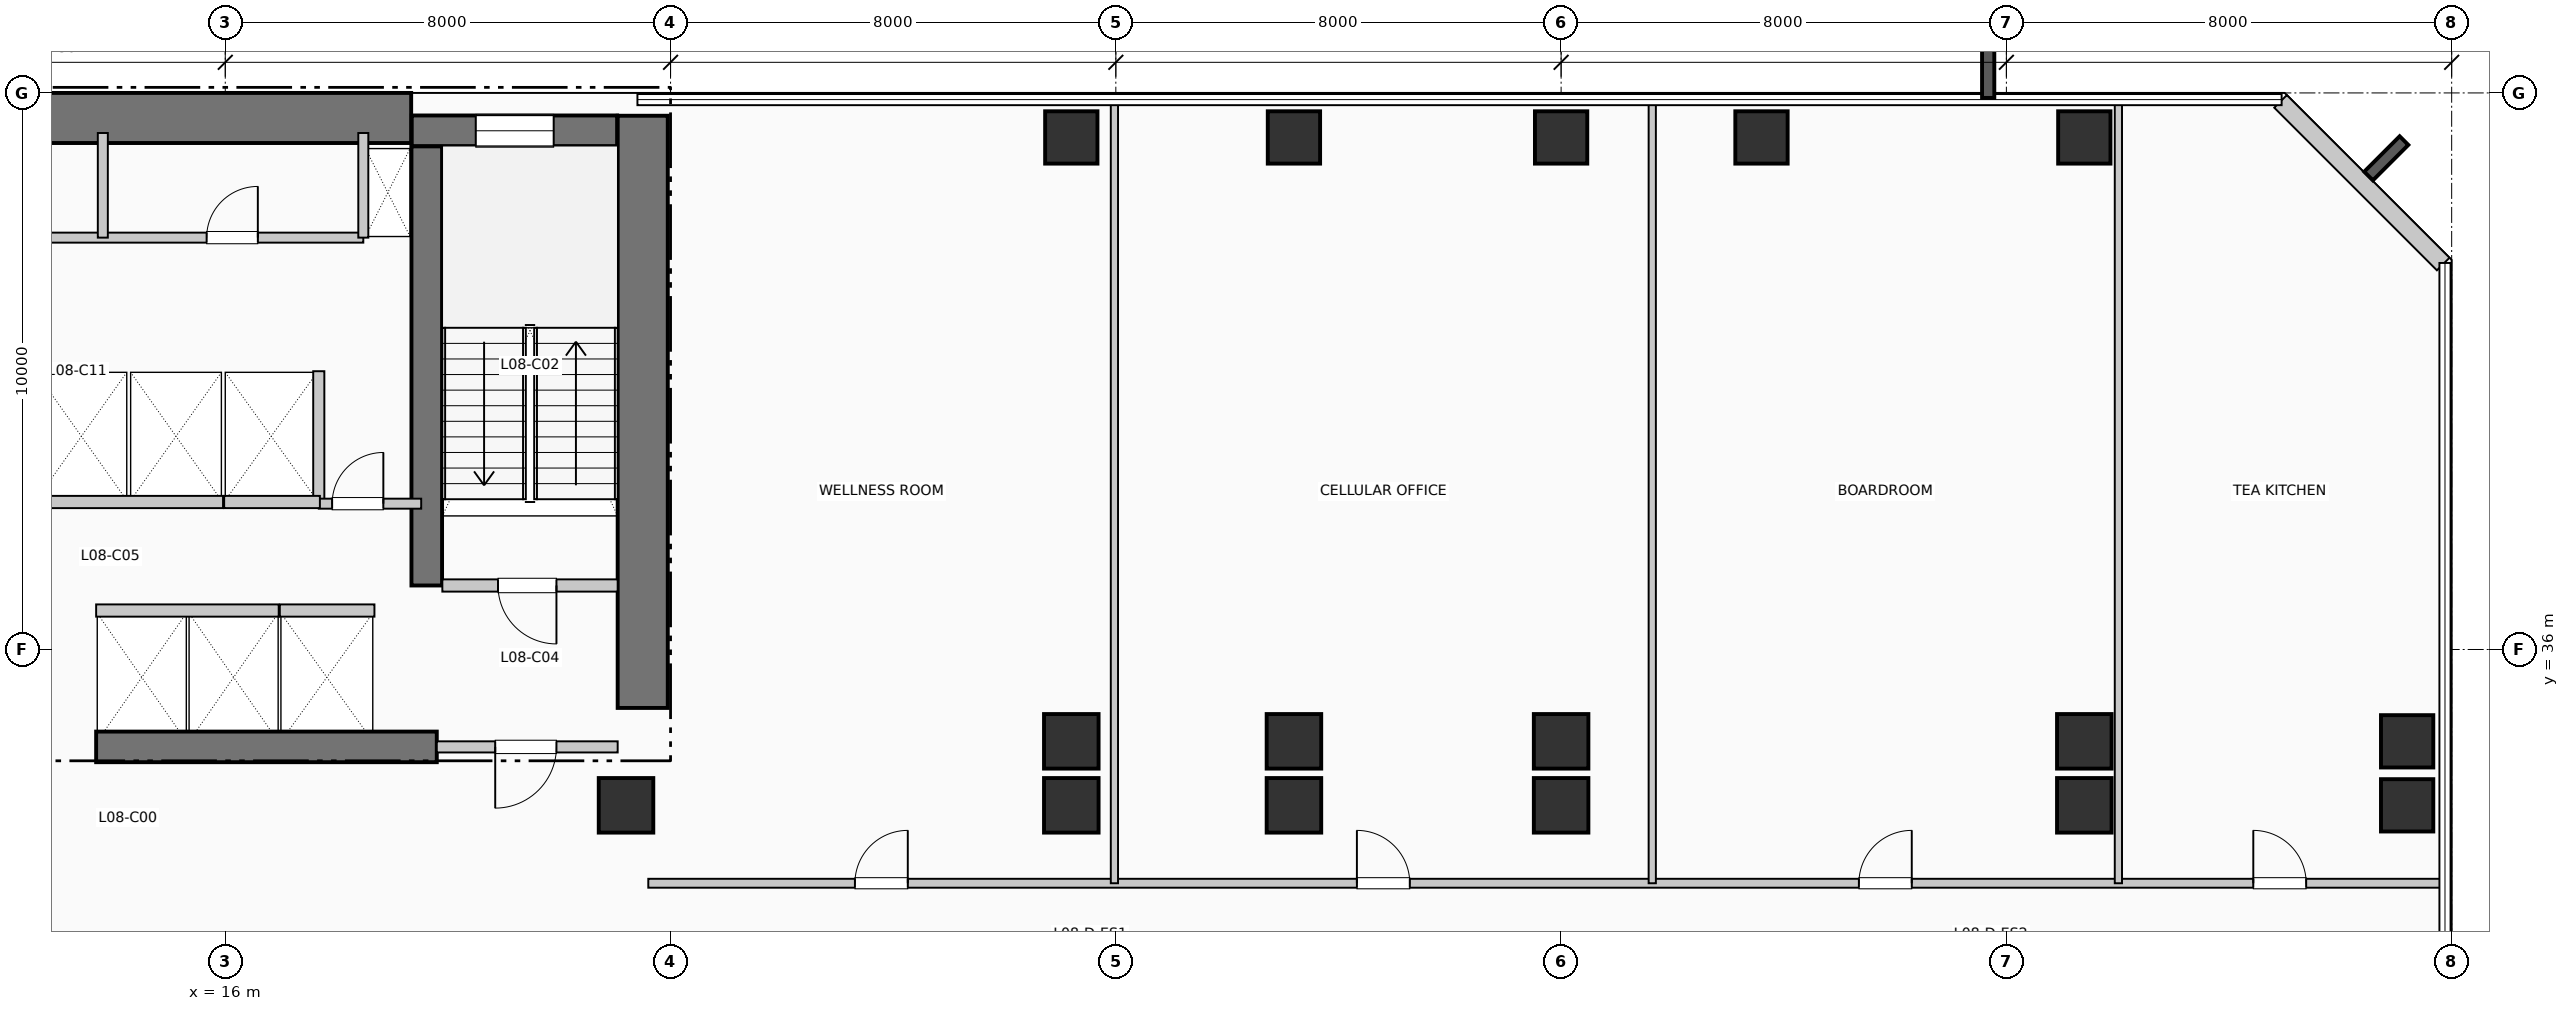
"""IFC4 building model, lengths in metres.
Left out: names, types, materials, properties, quantities, classifications, styles, units other than length and angle.
Written with IfcOpenShell. Run it as: python <this file> out.ifc"""

import sys

from ifc_helpers import new_model, si_unit, direction, frame, frame_2d, origin, origin_2d, place, context, subcontext, project, spatial, rectangle, extrude, element, fill, save


model = new_model("IFC4")
c1 = context("Model", 3, precision=1e-05, world=origin(), true_north=direction((0.0, 1.0)))
c2 = subcontext(c1, "Body", "Model", "MODEL_VIEW")
j1 = project(units=[si_unit("LENGTHUNIT", "METRE"), si_unit("PLANEANGLEUNIT", "RADIAN")], contexts=[c1])
p1 = place(None, origin())
s1 = spatial("IfcSite", under=j1, at=p1, CompositionType="ELEMENT")
p2 = place(p1, origin())
s2 = spatial("IfcBuilding", under=s1, at=p2, CompositionType="ELEMENT")
p3 = place(p2, frame((0.0, 0.0, 38.28)))
s3 = spatial("IfcBuildingStorey", under=s2, at=p3, CompositionType="ELEMENT", Elevation=38.28)
p4 = place(p3, frame((5.36, 45.55, 0.0), z_axis=(0.0, 0.0, 1.0), x_axis=(1.0, 0.0, 0.0)))
e1 = element("IfcWall", 1, at=p4, inside=s3, PredefinedType="SHEAR", context=c2, shape_type="SweptSolid", body=[
    extrude(rectangle(XDim=13.98, YDim=0.9, at=frame_2d((6.99, 0.0))), origin(), (0.0, 0.0, 1.0), 3.96),
])
p5 = place(p3, frame((23.5, 34.95, 0.0), z_axis=(0.0, 0.0, 1.0), x_axis=(0.0, 1.0, 0.0)))
e2 = element("IfcWall", 2, at=p5, inside=s3, PredefinedType="SHEAR", context=c2, shape_type="SweptSolid", body=[
    extrude(rectangle(XDim=10.64, YDim=0.9, at=frame_2d((5.32, 0.0))), origin(), (0.0, 0.0, 1.0), 3.96),
])
p6 = place(p3, frame((13.68, 34.25, 0.0), z_axis=(0.0, 0.0, 1.0), x_axis=(1.0, 0.0, 0.0)))
e3 = element("IfcWall", 3, at=p6, inside=s3, PredefinedType="SHEAR", context=c2, shape_type="SweptSolid", body=[
    extrude(rectangle(XDim=6.12, YDim=0.55, at=frame_2d((3.06, 0.0))), origin(), (0.0, 0.0, 1.0), 3.96),
])
p7 = place(p3, frame((19.62, 37.15, 0.0), z_axis=(0.0, 0.0, 1.0), x_axis=(0.0, 1.0, 0.0)))
e4 = element("IfcWall", 4, at=p7, inside=s3, PredefinedType="SHEAR", context=c2, shape_type="SweptSolid", body=[
    extrude(rectangle(XDim=7.89, YDim=0.55, at=frame_2d((3.945, 0.0))), origin(), (0.0, 0.0, 1.0), 3.96),
])
p8 = place(p3, frame((19.35, 45.32, 0.0), z_axis=(0.0, 0.0, 1.0), x_axis=(1.0, 0.0, 0.0)))
e5 = element("IfcWall", 5, at=p8, inside=s3, PredefinedType="SHEAR", context=c2, shape_type="SweptSolid", body=[
    extrude(rectangle(XDim=3.69, YDim=0.55, at=frame_2d((1.845, 0.0))), origin(), (0.0, 0.0, 1.0), 3.96),
])
p9 = place(p8, frame((1.15, 0.0, 1.05)))
e6 = element("IfcOpeningElement", 6, at=p9, cuts=e5, PredefinedType="OPENING", context=c2, shape_type="SweptSolid", body=[
    extrude(rectangle(XDim=1.4, YDim=1.8, at=frame_2d((0.7, 0.9))), frame((0.0, 0.285, 0.0), z_axis=(0.0, -1.0, 0.0), x_axis=(1.0, 0.0, 0.0)), (0.0, 0.0, 1.0), 0.57),
])
for number, where, z_axis, x_axis in (
    (7, (23.2, 33.2, 0.0), (0.0, 0.0, 1.0), (1.0, 0.0, 0.0)),
    (8, (31.2, 33.2, 0.0), (0.0, 0.0, 1.0), (1.0, 0.0, 0.0)),
    (9, (31.2, 34.35, 0.0), (0.0, 0.0, 1.0), (1.0, 0.0, 0.0)),
):
    element("IfcColumn", number, at=place(p3, frame(where, z_axis=z_axis, x_axis=x_axis)), inside=s3, PredefinedType="COLUMN", context=c2, shape_type="SweptSolid", body=[
        extrude(rectangle(XDim=0.98, YDim=0.98, at=origin_2d()), origin(), (0.0, 0.0, 1.0), 3.96),
    ])
p10 = place(p3, frame((31.2, 45.2, 0.0), z_axis=(0.0, 0.0, 1.0), x_axis=(1.0, 0.0, 0.0)))
e10 = element("IfcColumn", 10, at=p10, inside=s3, PredefinedType="COLUMN", context=c2, shape_type="SweptSolid", body=[
    extrude(rectangle(XDim=0.94, YDim=0.94, at=origin_2d()), origin(), (0.0, 0.0, 1.0), 3.96),
])
for number, where, z_axis, x_axis in (
    (11, (35.2, 33.2, 0.0), (0.0, 0.0, 1.0), (1.0, 0.0, 0.0)),
    (12, (35.2, 34.35, 0.0), (0.0, 0.0, 1.0), (1.0, 0.0, 0.0)),
):
    element("IfcColumn", number, at=place(p3, frame(where, z_axis=z_axis, x_axis=x_axis)), inside=s3, PredefinedType="COLUMN", context=c2, shape_type="SweptSolid", body=[
        extrude(rectangle(XDim=0.98, YDim=0.98, at=origin_2d()), origin(), (0.0, 0.0, 1.0), 3.96),
    ])
p11 = place(p3, frame((35.2, 45.2, 0.0), z_axis=(0.0, 0.0, 1.0), x_axis=(1.0, 0.0, 0.0)))
e13 = element("IfcColumn", 13, at=p11, inside=s3, PredefinedType="COLUMN", context=c2, shape_type="SweptSolid", body=[
    extrude(rectangle(XDim=0.94, YDim=0.94, at=origin_2d()), origin(), (0.0, 0.0, 1.0), 3.96),
])
for number, where, z_axis, x_axis in (
    (14, (40.0, 33.2, 0.0), (0.0, 0.0, 1.0), (1.0, 0.0, 0.0)),
    (15, (40.0, 34.35, 0.0), (0.0, 0.0, 1.0), (1.0, 0.0, 0.0)),
):
    element("IfcColumn", number, at=place(p3, frame(where, z_axis=z_axis, x_axis=x_axis)), inside=s3, PredefinedType="COLUMN", context=c2, shape_type="SweptSolid", body=[
        extrude(rectangle(XDim=0.98, YDim=0.98, at=origin_2d()), origin(), (0.0, 0.0, 1.0), 3.96),
    ])
for number, where, z_axis, x_axis in (
    (16, (40.0, 45.2, 0.0), (0.0, 0.0, 1.0), (1.0, 0.0, 0.0)),
    (17, (43.6, 45.2, 0.0), (0.0, 0.0, 1.0), (1.0, 0.0, 0.0)),
):
    element("IfcColumn", number, at=place(p3, frame(where, z_axis=z_axis, x_axis=x_axis)), inside=s3, PredefinedType="COLUMN", context=c2, shape_type="SweptSolid", body=[
        extrude(rectangle(XDim=0.94, YDim=0.94, at=origin_2d()), origin(), (0.0, 0.0, 1.0), 3.96),
    ])
for number, where, z_axis, x_axis in (
    (18, (49.4, 33.2, 0.0), (0.0, 0.0, 1.0), (1.0, 0.0, 0.0)),
    (19, (49.4, 34.35, 0.0), (0.0, 0.0, 1.0), (1.0, 0.0, 0.0)),
):
    element("IfcColumn", number, at=place(p3, frame(where, z_axis=z_axis, x_axis=x_axis)), inside=s3, PredefinedType="COLUMN", context=c2, shape_type="SweptSolid", body=[
        extrude(rectangle(XDim=0.98, YDim=0.98, at=origin_2d()), origin(), (0.0, 0.0, 1.0), 3.96),
    ])
for number, where, z_axis, x_axis in (
    (20, (49.4, 45.2, 0.0), (0.0, 0.0, 1.0), (1.0, 0.0, 0.0)),
    (21, (55.2, 33.2, 0.0), (0.0, 0.0, 1.0), (1.0, 0.0, 0.0)),
    (22, (55.2, 34.35, 0.0), (0.0, 0.0, 1.0), (1.0, 0.0, 0.0)),
):
    element("IfcColumn", number, at=place(p3, frame(where, z_axis=z_axis, x_axis=x_axis)), inside=s3, PredefinedType="COLUMN", context=c2, shape_type="SweptSolid", body=[
        extrude(rectangle(XDim=0.94, YDim=0.94, at=origin_2d()), origin(), (0.0, 0.0, 1.0), 3.96),
    ])
p12 = place(p3, frame((55.848, 42.926, 0.0), z_axis=(0.0, 0.0, 1.0), x_axis=(-0.707106781187, 0.707106781187, 0.0)))
e23 = element("IfcWall", 23, at=p12, inside=s3, PredefinedType="SOLIDWALL", context=c2, shape_type="SweptSolid", body=[
    extrude(rectangle(XDim=4.133, YDim=0.32, at=frame_2d((2.066, 0.0))), origin(), (0.0, 0.0, 1.0), 3.71),
])
p13 = place(p3, frame((19.9, 37.15, 0.0), z_axis=(0.0, 0.0, 1.0), x_axis=(1.0, 0.0, 0.0)))
e24 = element("IfcWall", 24, at=p13, inside=s3, PredefinedType="PARTITIONING", context=c2, shape_type="SweptSolid", body=[
    extrude(rectangle(XDim=3.15, YDim=0.22, at=frame_2d((1.575, 0.0))), origin(), (0.0, 0.0, 1.0), 3.71),
])
p14 = place(p13, frame((2.05, 0.0, 0.0), z_axis=(0.0, 0.0, 1.0), x_axis=(-1.0, 0.0, 0.0)))
e25 = element("IfcOpeningElement", 25, at=p14, cuts=e24, PredefinedType="OPENING", context=c2, shape_type="SweptSolid", body=[
    extrude(rectangle(XDim=1.05, YDim=2.15, at=frame_2d((0.525, 1.075))), frame((0.0, 0.12, 0.0), z_axis=(0.0, -1.0, 0.0), x_axis=(1.0, 0.0, 0.0)), (0.0, 0.0, 1.0), 0.24),
])
p15 = place(p3, frame((19.8, 34.25, 0.0), z_axis=(0.0, 0.0, 1.0), x_axis=(1.0, 0.0, 0.0)))
e26 = element("IfcWall", 26, at=p15, inside=s3, PredefinedType="PARTITIONING", context=c2, shape_type="SweptSolid", body=[
    extrude(rectangle(XDim=3.25, YDim=0.2, at=frame_2d((1.625, 0.0))), origin(), (0.0, 0.0, 1.0), 3.71),
])
p16 = place(p15, frame((2.15, 0.0, 0.0), z_axis=(0.0, 0.0, 1.0), x_axis=(-1.0, 0.0, 0.0)))
e27 = element("IfcOpeningElement", 27, at=p16, cuts=e26, PredefinedType="OPENING", context=c2, shape_type="SweptSolid", body=[
    extrude(rectangle(XDim=1.1, YDim=2.15, at=frame_2d((0.55, 1.075))), frame((0.0, 0.11, 0.0), z_axis=(0.0, -1.0, 0.0), x_axis=(1.0, 0.0, 0.0)), (0.0, 0.0, 1.0), 0.22),
])
p17 = place(p3, frame((17.68, 38.65, 0.0), z_axis=(0.0, 0.0, 1.0), x_axis=(0.0, 1.0, 0.0)))
e28 = element("IfcWall", 28, at=p17, inside=s3, PredefinedType="PARTITIONING", context=c2, shape_type="SweptSolid", body=[
    extrude(rectangle(XDim=2.35, YDim=0.2, at=frame_2d((1.175, 0.0))), origin(), (0.0, 0.0, 1.0), 3.71),
])
p18 = place(p3, frame((17.68, 38.62, 0.0), z_axis=(0.0, 0.0, 1.0), x_axis=(1.0, 0.0, 0.0)))
e29 = element("IfcWall", 29, at=p18, inside=s3, PredefinedType="PARTITIONING", context=c2, shape_type="SweptSolid", body=[
    extrude(rectangle(XDim=1.84, YDim=0.18, at=frame_2d((0.92, 0.0))), origin(), (0.0, 0.0, 1.0), 3.71),
])
p19 = place(p18, frame((0.24, 0.0, 0.0)))
e30 = element("IfcOpeningElement", 30, at=p19, cuts=e29, PredefinedType="OPENING", context=c2, shape_type="SweptSolid", body=[
    extrude(rectangle(XDim=0.92, YDim=2.1, at=frame_2d((0.46, 1.05))), frame((0.0, 0.1, 0.0), z_axis=(0.0, -1.0, 0.0), x_axis=(1.0, 0.0, 0.0)), (0.0, 0.0, 1.0), 0.2),
])
p20 = place(p3, frame((13.68, 36.7, 0.0), z_axis=(0.0, 0.0, 1.0), x_axis=(1.0, 0.0, 0.0)))
e31 = element("IfcWall", 31, at=p20, inside=s3, PredefinedType="PARTITIONING", context=c2, shape_type="SweptSolid", body=[
    extrude(rectangle(XDim=3.28, YDim=0.22, at=frame_2d((1.64, 0.0))), origin(), (0.0, 0.0, 1.0), 3.71),
])
p21 = place(p3, frame((12.58, 38.65, 0.0), z_axis=(0.0, 0.0, 1.0), x_axis=(1.0, 0.0, 0.0)))
e32 = element("IfcWall", 32, at=p21, inside=s3, PredefinedType="PARTITIONING", context=c2, shape_type="SweptSolid", body=[
    extrude(rectangle(XDim=3.38, YDim=0.22, at=frame_2d((1.69, 0.0))), origin(), (0.0, 0.0, 1.0), 3.71),
])
p22 = place(p3, frame((16.98, 36.7, 0.0), z_axis=(0.0, 0.0, 1.0), x_axis=(1.0, 0.0, 0.0)))
e33 = element("IfcWall", 33, at=p22, inside=s3, PredefinedType="PARTITIONING", context=c2, shape_type="SweptSolid", body=[
    extrude(rectangle(XDim=1.7, YDim=0.22, at=frame_2d((0.85, 0.0))), origin(), (0.0, 0.0, 1.0), 3.71),
])
p23 = place(p3, frame((15.98, 38.65, 0.0), z_axis=(0.0, 0.0, 1.0), x_axis=(1.0, 0.0, 0.0)))
e34 = element("IfcWall", 34, at=p23, inside=s3, PredefinedType="PARTITIONING", context=c2, shape_type="SweptSolid", body=[
    extrude(rectangle(XDim=1.72, YDim=0.22, at=frame_2d((0.86, 0.0))), origin(), (0.0, 0.0, 1.0), 3.71),
])
p24 = place(p3, frame((9.15, 43.4, 0.0), z_axis=(0.0, 0.0, 1.0), x_axis=(1.0, 0.0, 0.0)))
e35 = element("IfcWall", 35, at=p24, inside=s3, PredefinedType="PLUMBINGWALL", context=c2, shape_type="SweptSolid", body=[
    extrude(rectangle(XDim=9.33, YDim=0.18, at=frame_2d((4.665, 0.0))), origin(), (0.0, 0.0, 1.0), 3.71),
])
p25 = place(p24, frame((1.88, 0.0, 0.0)))
e36 = element("IfcOpeningElement", 36, at=p25, cuts=e35, PredefinedType="OPENING", context=c2, shape_type="SweptSolid", body=[
    extrude(rectangle(XDim=0.92, YDim=2.1, at=frame_2d((0.46, 1.05))), frame((0.0, 0.1, 0.0), z_axis=(0.0, -1.0, 0.0), x_axis=(1.0, 0.0, 0.0)), (0.0, 0.0, 1.0), 0.2),
])
p26 = place(p24, frame((6.515, 0.0, 0.0)))
e37 = element("IfcOpeningElement", 37, at=p26, cuts=e35, PredefinedType="OPENING", context=c2, shape_type="SweptSolid", body=[
    extrude(rectangle(XDim=0.92, YDim=2.1, at=frame_2d((0.46, 1.05))), frame((0.0, 0.1, 0.0), z_axis=(0.0, -1.0, 0.0), x_axis=(1.0, 0.0, 0.0)), (0.0, 0.0, 1.0), 0.2),
])
for number, where, z_axis, x_axis in (
    (38, (18.48, 43.4, 0.0), (0.0, 0.0, 1.0), (0.0, 1.0, 0.0)),
    (39, (13.8, 43.4, 0.0), (0.0, 0.0, 1.0), (0.0, 1.0, 0.0)),
):
    element("IfcWall", number, at=place(p3, frame(where, z_axis=z_axis, x_axis=x_axis)), inside=s3, PredefinedType="PLUMBINGWALL", context=c2, shape_type="SweptSolid", body=[
        extrude(rectangle(XDim=1.88, YDim=0.18, at=frame_2d((0.94, 0.0))), origin(), (0.0, 0.0, 1.0), 3.71),
    ])
p27 = place(p3, frame((23.6, 31.8, 0.0), z_axis=(0.0, 0.0, 1.0), x_axis=(1.0, 0.0, 0.0)))
e40 = element("IfcWall", 40, at=p27, inside=s3, PredefinedType="PARTITIONING", context=c2, shape_type="SweptSolid", body=[
    extrude(rectangle(XDim=32.21, YDim=0.16, at=frame_2d((16.105, 0.0))), origin(), (0.0, 0.0, 1.0), 3.71),
])
p28 = place(p27, frame((3.712, 0.0, 0.0)))
e41 = element("IfcOpeningElement", 41, at=p28, cuts=e40, PredefinedType="OPENING", context=c2, shape_type="SweptSolid", body=[
    extrude(rectangle(XDim=0.95, YDim=2.15, at=frame_2d((0.475, 1.075))), frame((0.0, 0.09, 0.0), z_axis=(0.0, -1.0, 0.0), x_axis=(1.0, 0.0, 0.0)), (0.0, 0.0, 1.0), 0.18),
])
p29 = place(p27, frame((12.731, 0.0, 0.0)))
e42 = element("IfcOpeningElement", 42, at=p29, cuts=e40, PredefinedType="OPENING", context=c2, shape_type="SweptSolid", body=[
    extrude(rectangle(XDim=0.95, YDim=2.15, at=frame_2d((0.475, 1.075))), frame((0.0, 0.09, 0.0), z_axis=(0.0, -1.0, 0.0), x_axis=(1.0, 0.0, 0.0)), (0.0, 0.0, 1.0), 0.18),
])
p30 = place(p27, frame((21.75, 0.0, 0.0)))
e43 = element("IfcOpeningElement", 43, at=p30, cuts=e40, PredefinedType="OPENING", context=c2, shape_type="SweptSolid", body=[
    extrude(rectangle(XDim=0.95, YDim=2.15, at=frame_2d((0.475, 1.075))), frame((0.0, 0.09, 0.0), z_axis=(0.0, -1.0, 0.0), x_axis=(1.0, 0.0, 0.0)), (0.0, 0.0, 1.0), 0.18),
])
p31 = place(p27, frame((28.836, 0.0, 0.0)))
e44 = element("IfcOpeningElement", 44, at=p31, cuts=e40, PredefinedType="OPENING", context=c2, shape_type="SweptSolid", body=[
    extrude(rectangle(XDim=0.95, YDim=2.15, at=frame_2d((0.475, 1.075))), frame((0.0, 0.09, 0.0), z_axis=(0.0, -1.0, 0.0), x_axis=(1.0, 0.0, 0.0)), (0.0, 0.0, 1.0), 0.18),
])
for number, where, z_axis, x_axis in (
    (45, (31.975, 31.8, 0.0), (0.0, 0.0, 1.0), (0.0, 1.0, 0.0)),
    (46, (41.638, 31.8, 0.0), (0.0, 0.0, 1.0), (0.0, 1.0, 0.0)),
    (47, (50.012, 31.8, 0.0), (0.0, 0.0, 1.0), (0.0, 1.0, 0.0)),
):
    element("IfcWall", number, at=place(p3, frame(where, z_axis=z_axis, x_axis=x_axis)), inside=s3, PredefinedType="PARTITIONING", context=c2, shape_type="SweptSolid", body=[
        extrude(rectangle(XDim=14.01, YDim=0.13, at=frame_2d((7.005, 0.0))), origin(), (0.0, 0.0, 1.0), 3.71),
    ])
p32 = place(p9, origin())
e48 = element("IfcWindow", 48, at=p32, inside=s3, PartitioningType="SINGLE_PANEL", PredefinedType="WINDOW", context=c2, shape_type="SweptSolid", body=[
    extrude(rectangle(XDim=1.4, YDim=1.8, at=frame_2d((0.7, 0.9))), frame((0.0, 0.03, 0.0), z_axis=(0.0, -1.0, 0.0), x_axis=(1.0, 0.0, 0.0)), (0.0, 0.0, 1.0), 0.06),
])
fill(e6, e48)
p33 = place(p14, origin())
e49 = element("IfcDoor", 49, at=p33, inside=s3, OperationType="SINGLE_SWING_RIGHT", PredefinedType="DOOR", context=c2, shape_type="SweptSolid", body=[
    extrude(rectangle(XDim=1.05, YDim=2.15, at=frame_2d((0.525, 1.075))), frame((0.0, 0.025, 0.0), z_axis=(0.0, -1.0, 0.0), x_axis=(1.0, 0.0, 0.0)), (0.0, 0.0, 1.0), 0.05),
])
fill(e25, e49)
p34 = place(p16, origin())
e50 = element("IfcDoor", 50, at=p34, inside=s3, OperationType="SINGLE_SWING_LEFT", PredefinedType="DOOR", context=c2, shape_type="SweptSolid", body=[
    extrude(rectangle(XDim=1.1, YDim=2.15, at=frame_2d((0.55, 1.075))), frame((0.0, 0.025, 0.0), z_axis=(0.0, -1.0, 0.0), x_axis=(1.0, 0.0, 0.0)), (0.0, 0.0, 1.0), 0.05),
])
fill(e27, e50)
p35 = place(p19, origin())
e51 = element("IfcDoor", 51, at=p35, inside=s3, OperationType="SINGLE_SWING_RIGHT", PredefinedType="DOOR", context=c2, shape_type="SweptSolid", body=[
    extrude(rectangle(XDim=0.92, YDim=2.1, at=frame_2d((0.46, 1.05))), frame((0.0, 0.025, 0.0), z_axis=(0.0, -1.0, 0.0), x_axis=(1.0, 0.0, 0.0)), (0.0, 0.0, 1.0), 0.05),
])
fill(e30, e51)
p36 = place(p26, origin())
e52 = element("IfcDoor", 52, at=p36, inside=s3, OperationType="SINGLE_SWING_RIGHT", PredefinedType="DOOR", context=c2, shape_type="SweptSolid", body=[
    extrude(rectangle(XDim=0.92, YDim=2.1, at=frame_2d((0.46, 1.05))), frame((0.0, 0.025, 0.0), z_axis=(0.0, -1.0, 0.0), x_axis=(1.0, 0.0, 0.0)), (0.0, 0.0, 1.0), 0.05),
])
fill(e37, e52)
p37 = place(p28, origin())
e53 = element("IfcDoor", 53, at=p37, inside=s3, OperationType="SINGLE_SWING_RIGHT", PredefinedType="DOOR", context=c2, shape_type="SweptSolid", body=[
    extrude(rectangle(XDim=0.95, YDim=2.15, at=frame_2d((0.475, 1.075))), frame((0.0, 0.025, 0.0), z_axis=(0.0, -1.0, 0.0), x_axis=(1.0, 0.0, 0.0)), (0.0, 0.0, 1.0), 0.05),
])
fill(e41, e53)
p38 = place(p29, origin())
e54 = element("IfcDoor", 54, at=p38, inside=s3, OperationType="SINGLE_SWING_LEFT", PredefinedType="DOOR", context=c2, shape_type="SweptSolid", body=[
    extrude(rectangle(XDim=0.95, YDim=2.15, at=frame_2d((0.475, 1.075))), frame((0.0, 0.025, 0.0), z_axis=(0.0, -1.0, 0.0), x_axis=(1.0, 0.0, 0.0)), (0.0, 0.0, 1.0), 0.05),
])
fill(e42, e54)
p39 = place(p30, origin())
e55 = element("IfcDoor", 55, at=p39, inside=s3, OperationType="SINGLE_SWING_RIGHT", PredefinedType="DOOR", context=c2, shape_type="SweptSolid", body=[
    extrude(rectangle(XDim=0.95, YDim=2.15, at=frame_2d((0.475, 1.075))), frame((0.0, 0.025, 0.0), z_axis=(0.0, -1.0, 0.0), x_axis=(1.0, 0.0, 0.0)), (0.0, 0.0, 1.0), 0.05),
])
fill(e43, e55)
p40 = place(p31, origin())
e56 = element("IfcDoor", 56, at=p40, inside=s3, OperationType="SINGLE_SWING_LEFT", PredefinedType="DOOR", context=c2, shape_type="SweptSolid", body=[
    extrude(rectangle(XDim=0.95, YDim=2.15, at=frame_2d((0.475, 1.075))), frame((0.0, 0.025, 0.0), z_axis=(0.0, -1.0, 0.0), x_axis=(1.0, 0.0, 0.0)), (0.0, 0.0, 1.0), 0.05),
])
fill(e44, e56)
save(model, sys.argv[1])
